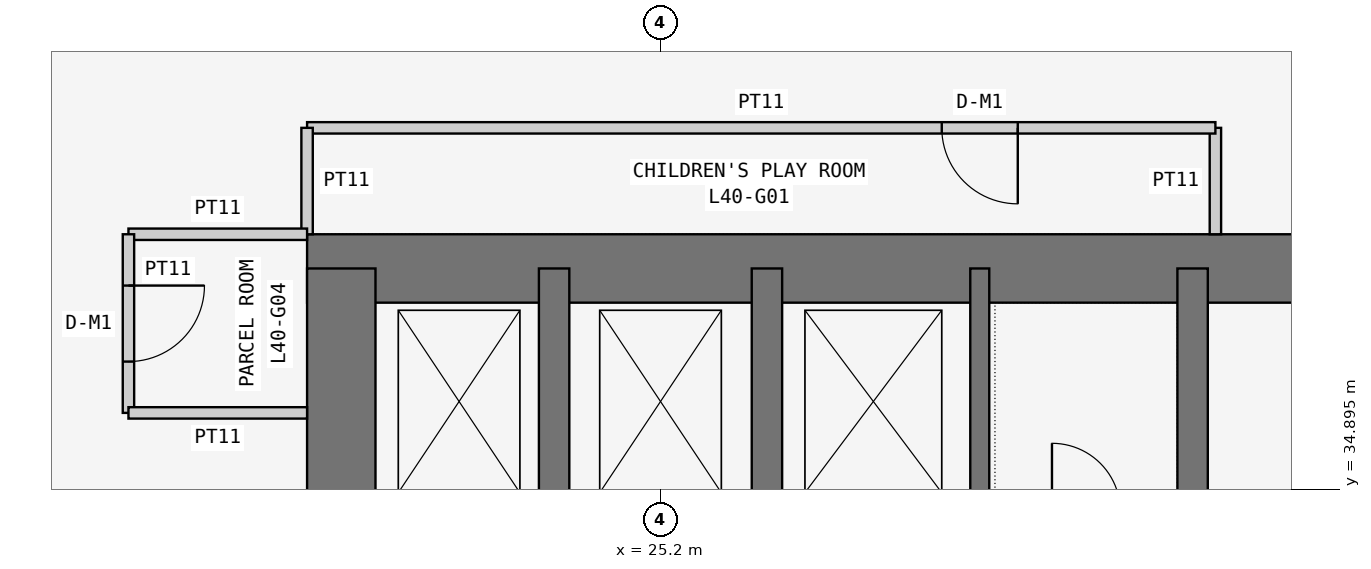
"""IFC4 building model, lengths in metres.
Left out: names, types, materials, properties, quantities, classifications, styles, units other than length and angle.
Written with IfcOpenShell. Run it as: python <this file> out.ifc"""

import sys

from ifc_helpers import new_model, si_unit, direction, frame, frame_2d, origin, place, context, subcontext, project, spatial, rectangle, extrude, element, fill, save


model = new_model("IFC4")
c1 = context("Model", 3, precision=1e-05, world=origin(), true_north=direction((0.0, 1.0)))
c2 = subcontext(c1, "Body", "Model", "MODEL_VIEW")
j1 = project(units=[si_unit("LENGTHUNIT", "METRE"), si_unit("PLANEANGLEUNIT", "RADIAN")], contexts=[c1])
p1 = place(None, origin())
s1 = spatial("IfcSite", under=j1, at=p1, CompositionType="ELEMENT")
p2 = place(p1, origin())
s2 = spatial("IfcBuilding", under=s1, at=p2, CompositionType="ELEMENT")
p3 = place(p2, frame((0.0, 0.0, 155.7)))
s3 = spatial("IfcBuildingStorey", under=s2, at=p3, CompositionType="ELEMENT", Elevation=155.7)
p4 = place(p3, frame((37.8, 37.8, 0.0), z_axis=(0.0, 0.0, 1.0), x_axis=(-1.0, 0.0, 0.0)))
e1 = element("IfcWall", 1, at=p4, inside=s3, PredefinedType="SHEAR", context=c2, shape_type="SweptSolid", body=[
    extrude(rectangle(XDim=17.25, YDim=0.9, at=frame_2d((8.625, 0.0))), origin(), (0.0, 0.0, 1.0), 3.6),
])
p5 = place(p3, frame((21.0, 37.8, 0.0), z_axis=(0.0, 0.0, 1.0), x_axis=(0.0, -1.0, 0.0)))
e2 = element("IfcWall", 2, at=p5, inside=s3, PredefinedType="SHEAR", context=c2, shape_type="SweptSolid", body=[
    extrude(rectangle(XDim=17.25, YDim=0.9, at=frame_2d((8.625, 0.0))), origin(), (0.0, 0.0, 1.0), 3.6),
])
p6 = place(p5, frame((5.4, 0.0, 0.0)))
e3 = element("IfcOpeningElement", 3, at=p6, cuts=e2, PredefinedType="OPENING", context=c2, shape_type="SweptSolid", body=[
    extrude(rectangle(XDim=1.2, YDim=2.1, at=frame_2d((0.6, 1.05))), frame((0.0, 0.46, 0.0), z_axis=(0.0, -1.0, 0.0), x_axis=(1.0, 0.0, 0.0)), (0.0, 0.0, 1.0), 0.92),
])
p7 = place(p3, frame((26.6, 21.0, 0.0), z_axis=(0.0, 0.0, 1.0), x_axis=(0.0, 1.0, 0.0)))
e4 = element("IfcWall", 4, at=p7, inside=s3, PredefinedType="SHEAR", context=c2, shape_type="SweptSolid", body=[
    extrude(rectangle(XDim=16.8, YDim=0.4, at=frame_2d((8.4, 0.0))), origin(), (0.0, 0.0, 1.0), 3.6),
])
p8 = place(p7, frame((10.4, 0.0, 0.0)))
e5 = element("IfcOpeningElement", 5, at=p8, cuts=e4, PredefinedType="OPENING", context=c2, shape_type="SweptSolid", body=[
    extrude(rectangle(XDim=1.2, YDim=2.1, at=frame_2d((0.6, 1.05))), frame((0.0, 0.21, 0.0), z_axis=(0.0, -1.0, 0.0), x_axis=(1.0, 0.0, 0.0)), (0.0, 0.0, 1.0), 0.42),
])
p9 = place(p3, frame((23.8, 34.6, 0.0), z_axis=(0.0, 0.0, 1.0), x_axis=(0.0, 1.0, 0.0)))
e6 = element("IfcWall", 6, at=p9, inside=s3, PredefinedType="SHEAR", context=c2, shape_type="SweptSolid", body=[
    extrude(rectangle(XDim=3.2, YDim=0.4, at=frame_2d((1.6, 0.0))), origin(), (0.0, 0.0, 1.0), 3.6),
])
p10 = place(p3, frame((32.2, 29.2, 0.0), z_axis=(0.0, 0.0, 1.0), x_axis=(0.0, 1.0, 0.0)))
e7 = element("IfcWall", 7, at=p10, inside=s3, PredefinedType="SHEAR", context=c2, shape_type="SweptSolid", body=[
    extrude(rectangle(XDim=8.6, YDim=0.4, at=frame_2d((4.3, 0.0))), origin(), (0.0, 0.0, 1.0), 3.6),
])
p11 = place(p3, frame((29.4, 34.6, 0.0), z_axis=(0.0, 0.0, 1.0), x_axis=(0.0, 1.0, 0.0)))
e8 = element("IfcWall", 8, at=p11, inside=s3, PredefinedType="SHEAR", context=c2, shape_type="SweptSolid", body=[
    extrude(rectangle(XDim=3.2, YDim=0.25, at=frame_2d((1.6, 0.0))), origin(), (0.0, 0.0, 1.0), 3.6),
])
p12 = place(p3, frame((32.5, 38.25, 0.0), z_axis=(0.0, 0.0, 1.0), x_axis=(0.0, 1.0, 0.0)))
e9 = element("IfcWall", 9, at=p12, inside=s3, PredefinedType="PARTITIONING", context=c2, shape_type="SweptSolid", body=[
    extrude(rectangle(XDim=1.4, YDim=0.15, at=frame_2d((0.7, 0.0))), origin(), (0.0, 0.0, 1.0), 3.45),
])
p13 = place(p3, frame((32.5, 39.65, 0.0), z_axis=(0.0, 0.0, 1.0), x_axis=(-1.0, 0.0, 0.0)))
e10 = element("IfcWall", 10, at=p13, inside=s3, PredefinedType="PARTITIONING", context=c2, shape_type="SweptSolid", body=[
    extrude(rectangle(XDim=11.95, YDim=0.15, at=frame_2d((5.975, 0.0))), origin(), (0.0, 0.0, 1.0), 3.45),
])
p14 = place(p13, frame((2.6, 0.0, 0.0)))
e11 = element("IfcOpeningElement", 11, at=p14, cuts=e10, PredefinedType="OPENING", context=c2, shape_type="SweptSolid", body=[
    extrude(rectangle(XDim=1.0, YDim=2.1, at=frame_2d((0.5, 1.05))), frame((0.0, 0.085, 0.0), z_axis=(0.0, -1.0, 0.0), x_axis=(1.0, 0.0, 0.0)), (0.0, 0.0, 1.0), 0.17),
])
p15 = place(p3, frame((20.55, 39.65, 0.0), z_axis=(0.0, 0.0, 1.0), x_axis=(0.0, -1.0, 0.0)))
e12 = element("IfcWall", 12, at=p15, inside=s3, PredefinedType="PARTITIONING", context=c2, shape_type="SweptSolid", body=[
    extrude(rectangle(XDim=1.4, YDim=0.15, at=frame_2d((0.7, 0.0))), origin(), (0.0, 0.0, 1.0), 3.45),
])
p16 = place(p3, frame((20.55, 38.25, 0.0), z_axis=(0.0, 0.0, 1.0), x_axis=(-1.0, 0.0, 0.0)))
e13 = element("IfcWall", 13, at=p16, inside=s3, PredefinedType="PARTITIONING", context=c2, shape_type="SweptSolid", body=[
    extrude(rectangle(XDim=2.35, YDim=0.15, at=frame_2d((1.175, 0.0))), origin(), (0.0, 0.0, 1.0), 3.45),
])
p17 = place(p3, frame((18.2, 38.25, 0.0), z_axis=(0.0, 0.0, 1.0), x_axis=(0.0, -1.0, 0.0)))
e14 = element("IfcWall", 14, at=p17, inside=s3, PredefinedType="PARTITIONING", context=c2, shape_type="SweptSolid", body=[
    extrude(rectangle(XDim=2.35, YDim=0.15, at=frame_2d((1.175, 0.0))), origin(), (0.0, 0.0, 1.0), 3.45),
])
p18 = place(p17, frame((0.675, 0.0, 0.0)))
e15 = element("IfcOpeningElement", 15, at=p18, cuts=e14, PredefinedType="OPENING", context=c2, shape_type="SweptSolid", body=[
    extrude(rectangle(XDim=1.0, YDim=2.1, at=frame_2d((0.5, 1.05))), frame((0.0, 0.085, 0.0), z_axis=(0.0, -1.0, 0.0), x_axis=(1.0, 0.0, 0.0)), (0.0, 0.0, 1.0), 0.17),
])
p19 = place(p3, frame((18.2, 35.9, 0.0), z_axis=(0.0, 0.0, 1.0), x_axis=(1.0, 0.0, 0.0)))
e16 = element("IfcWall", 16, at=p19, inside=s3, PredefinedType="PARTITIONING", context=c2, shape_type="SweptSolid", body=[
    extrude(rectangle(XDim=2.35, YDim=0.15, at=frame_2d((1.175, 0.0))), origin(), (0.0, 0.0, 1.0), 3.45),
])
p20 = place(p14, origin())
e17 = element("IfcDoor", 17, at=p20, inside=s3, OperationType="SINGLE_SWING_LEFT", PredefinedType="DOOR", context=c2, shape_type="SweptSolid", body=[
    extrude(rectangle(XDim=1.0, YDim=2.1, at=frame_2d((0.5, 1.05))), frame((0.0, 0.025, 0.0), z_axis=(0.0, -1.0, 0.0), x_axis=(1.0, 0.0, 0.0)), (0.0, 0.0, 1.0), 0.05),
])
fill(e11, e17)
p21 = place(p18, origin())
e18 = element("IfcDoor", 18, at=p21, inside=s3, OperationType="SINGLE_SWING_LEFT", PredefinedType="DOOR", context=c2, shape_type="SweptSolid", body=[
    extrude(rectangle(XDim=1.0, YDim=2.1, at=frame_2d((0.5, 1.05))), frame((0.0, 0.025, 0.0), z_axis=(0.0, -1.0, 0.0), x_axis=(1.0, 0.0, 0.0)), (0.0, 0.0, 1.0), 0.05),
])
fill(e15, e18)
save(model, sys.argv[1])
